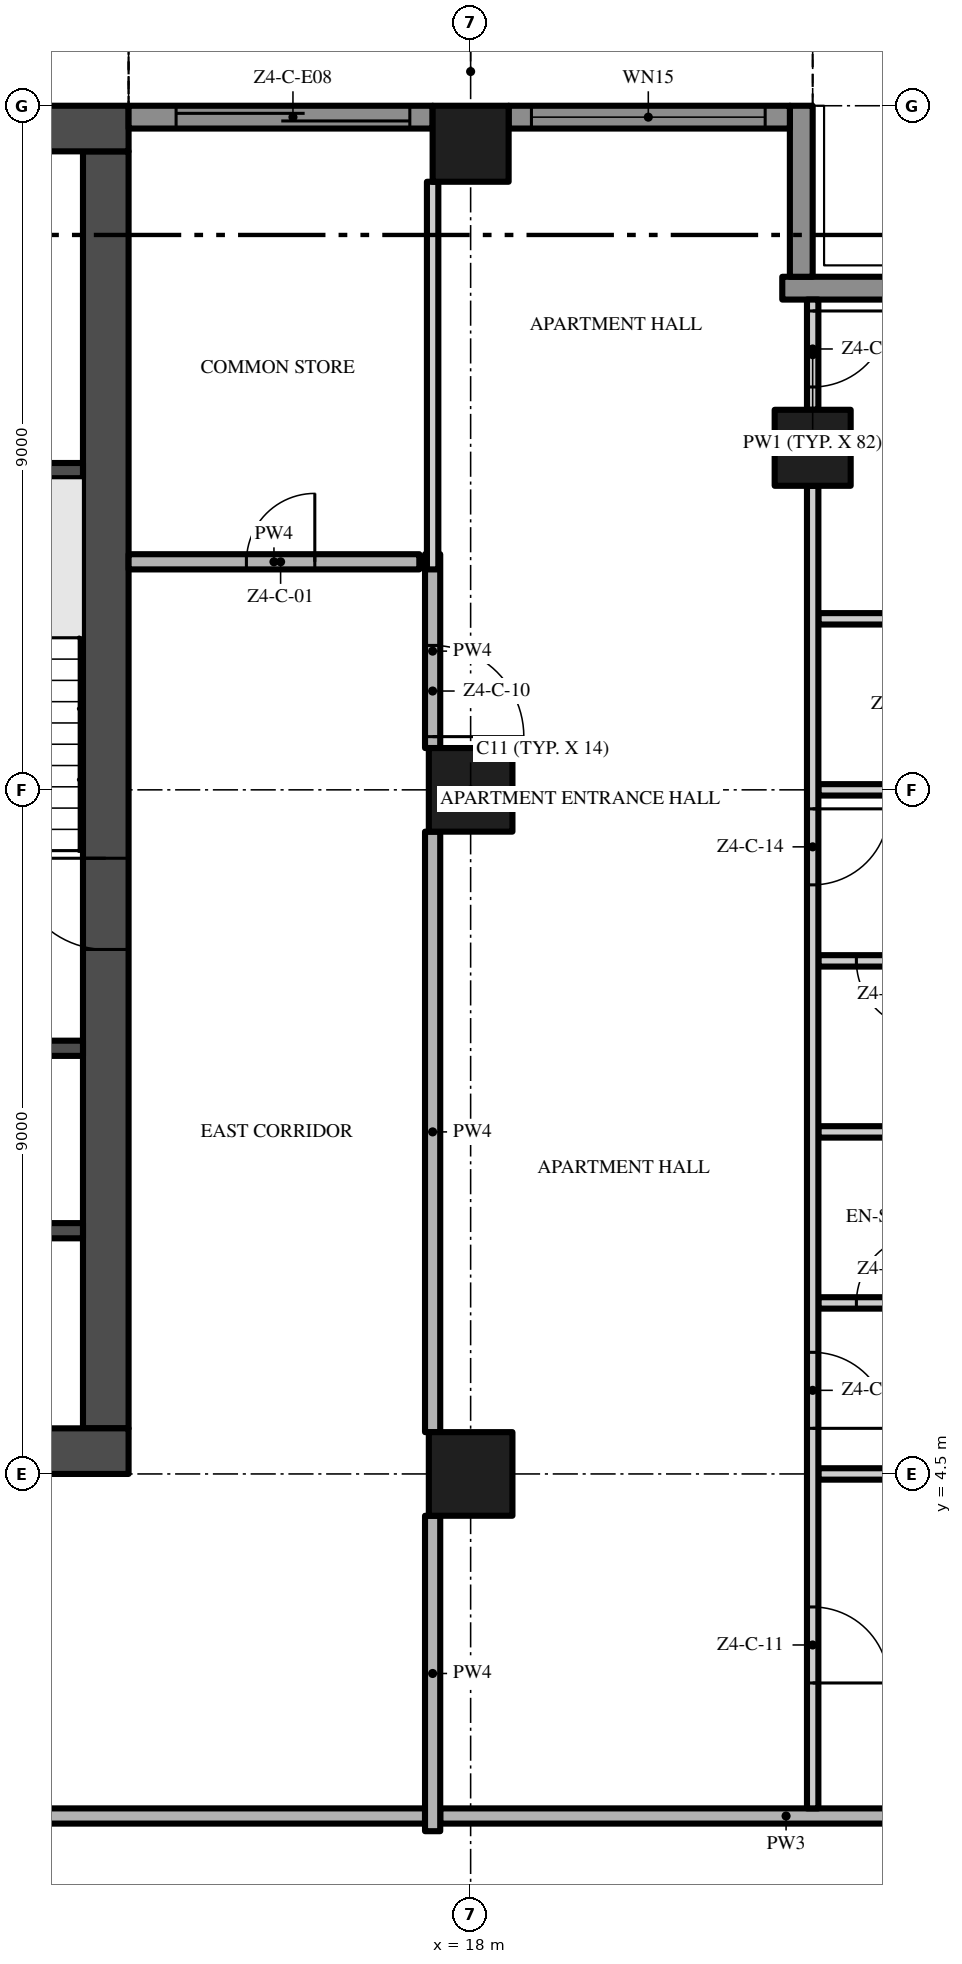
"""IFC4 building model, lengths in metres.
Left out: names, types, materials, properties, quantities, classifications, styles, units other than length and angle.
Written with IfcOpenShell. Run it as: python <this file> out.ifc"""

import sys

from ifc_helpers import new_model, si_unit, direction, frame, frame_2d, origin, origin_2d, place, context, subcontext, project, spatial, rectangle, extrude, element, fill, save


model = new_model("IFC4")
c1 = context("Model", 3, precision=1e-05, world=origin(), true_north=direction((0.0, 1.0)))
c2 = subcontext(c1, "Body", "Model", "MODEL_VIEW")
j1 = project(units=[si_unit("LENGTHUNIT", "METRE"), si_unit("PLANEANGLEUNIT", "RADIAN")], contexts=[c1])
p1 = place(None, origin())
s1 = spatial("IfcSite", under=j1, at=p1, CompositionType="ELEMENT")
p2 = place(p1, origin())
s2 = spatial("IfcBuilding", under=s1, at=p2, CompositionType="ELEMENT")
p3 = place(p2, frame((0.0, 0.0, 207.2)))
s3 = spatial("IfcBuildingStorey", under=s2, at=p3, CompositionType="ELEMENT", Elevation=207.2)
p4 = place(p3, frame((-13.5, 4.8, -0.3), z_axis=(0.0, 0.0, 1.0), x_axis=(1.0, 0.0, 0.0)))
e1 = element("IfcWall", 1, at=p4, inside=s3, PredefinedType="SHEAR", context=c2, shape_type="SweptSolid", body=[
    extrude(rectangle(XDim=27.0, YDim=0.6, at=frame_2d((13.5, 0.0))), origin(), (0.0, 0.0, 1.0), 3.8),
])
p5 = place(p4, frame((12.0, 0.0, 0.3)))
e2 = element("IfcOpeningElement", 2, at=p5, cuts=e1, PredefinedType="OPENING", context=c2, shape_type="SweptSolid", body=[
    extrude(rectangle(XDim=3.0, YDim=2.4, at=frame_2d((1.5, 1.2))), frame((0.0, 0.31, 0.0), z_axis=(0.0, -1.0, 0.0), x_axis=(1.0, 0.0, 0.0)), (0.0, 0.0, 1.0), 0.62),
])
p6 = place(p4, frame((4.9, 0.0, 0.3)))
e3 = element("IfcOpeningElement", 3, at=p6, cuts=e1, PredefinedType="OPENING", context=c2, shape_type="SweptSolid", body=[
    extrude(rectangle(XDim=1.2, YDim=2.2, at=frame_2d((0.6, 1.1))), frame((0.0, 0.31, 0.0), z_axis=(0.0, -1.0, 0.0), x_axis=(1.0, 0.0, 0.0)), (0.0, 0.0, 1.0), 0.62),
])
p7 = place(p4, frame((20.75, 0.0, 0.3)))
e4 = element("IfcOpeningElement", 4, at=p7, cuts=e1, PredefinedType="OPENING", context=c2, shape_type="SweptSolid", body=[
    extrude(rectangle(XDim=1.5, YDim=2.2, at=frame_2d((0.75, 1.1))), frame((0.0, 0.31, 0.0), z_axis=(0.0, -1.0, 0.0), x_axis=(1.0, 0.0, 0.0)), (0.0, 0.0, 1.0), 0.62),
])
p8 = place(p4, frame((17.4, 0.0, 0.3)))
e5 = element("IfcOpeningElement", 5, at=p8, cuts=e1, PredefinedType="OPENING", context=c2, shape_type="SweptSolid", body=[
    extrude(rectangle(XDim=1.2, YDim=2.2, at=frame_2d((0.6, 1.1))), frame((0.0, 0.31, 0.0), z_axis=(0.0, -1.0, 0.0), x_axis=(1.0, 0.0, 0.0)), (0.0, 0.0, 1.0), 0.62),
])
p9 = place(p3, frame((13.2, 5.1, -0.3), z_axis=(0.0, 0.0, 1.0), x_axis=(0.0, 1.0, 0.0)))
e6 = element("IfcWall", 6, at=p9, inside=s3, PredefinedType="SHEAR", context=c2, shape_type="SweptSolid", body=[
    extrude(rectangle(XDim=16.8, YDim=0.6, at=frame_2d((8.4, 0.0))), origin(), (0.0, 0.0, 1.0), 3.8),
])
p10 = place(p9, frame((6.3, 0.0, 0.3)))
e7 = element("IfcOpeningElement", 7, at=p10, cuts=e6, PredefinedType="OPENING", context=c2, shape_type="SweptSolid", body=[
    extrude(rectangle(XDim=1.2, YDim=2.2, at=frame_2d((0.6, 1.1))), frame((0.0, 0.31, 0.0), z_axis=(0.0, -1.0, 0.0), x_axis=(1.0, 0.0, 0.0)), (0.0, 0.0, 1.0), 0.62),
])
p11 = place(p3, frame((13.5, 22.2, -0.3), z_axis=(0.0, 0.0, 1.0), x_axis=(-1.0, 0.0, 0.0)))
e8 = element("IfcWall", 8, at=p11, inside=s3, PredefinedType="SHEAR", context=c2, shape_type="SweptSolid", body=[
    extrude(rectangle(XDim=27.0, YDim=0.6, at=frame_2d((13.5, 0.0))), origin(), (0.0, 0.0, 1.0), 3.8),
])
p12 = place(p3, frame((18.0, 13.5, 0.0), z_axis=(0.0, 0.0, 1.0), x_axis=(1.0, 0.0, 0.0)))
e9 = element("IfcColumn", 9, at=p12, inside=s3, PredefinedType="COLUMN", context=c2, shape_type="SweptSolid", body=[
    extrude(rectangle(XDim=1.1, YDim=1.1, at=origin_2d()), origin(), (0.0, 0.0, 1.0), 3.5),
])
p13 = place(p3, frame((18.0, 22.0, 0.0), z_axis=(0.0, 0.0, 1.0), x_axis=(1.0, 0.0, 0.0)))
e10 = element("IfcColumn", 10, at=p13, inside=s3, PredefinedType="COLUMN", context=c2, shape_type="SweptSolid", body=[
    extrude(rectangle(XDim=1.0, YDim=1.0, at=origin_2d()), origin(), (0.0, 0.0, 1.0), 3.5),
])
p14 = place(p3, frame((18.0, 4.5, 0.0), z_axis=(0.0, 0.0, 1.0), x_axis=(1.0, 0.0, 0.0)))
e11 = element("IfcColumn", 11, at=p14, inside=s3, PredefinedType="COLUMN", context=c2, shape_type="SweptSolid", body=[
    extrude(rectangle(XDim=1.1, YDim=1.1, at=origin_2d()), origin(), (0.0, 0.0, 1.0), 3.5),
])
p15 = place(p3, frame((22.5, 18.0, 0.0), z_axis=(0.0, 0.0, 1.0), x_axis=(1.0, 0.0, 0.0)))
e12 = element("IfcColumn", 12, at=p15, inside=s3, PredefinedType="COLUMN", context=c2, shape_type="SweptSolid", body=[
    extrude(rectangle(XDim=1.0, YDim=1.0, at=origin_2d()), origin(), (0.0, 0.0, 1.0), 3.5),
])
p16 = place(p3, frame((22.1, 20.1, 0.0), z_axis=(0.0, 0.0, 1.0), x_axis=(1.0, 0.0, 0.0)))
e13 = element("IfcWall", 13, at=p16, inside=s3, PredefinedType="SOLIDWALL", context=c2, shape_type="SweptSolid", body=[
    extrude(rectangle(XDim=2.35, YDim=0.3, at=frame_2d((1.175, 0.0))), origin(), (0.0, 0.0, 1.0), 3.5),
])
p17 = place(p3, frame((22.35, 22.5, 0.0), z_axis=(0.0, 0.0, 1.0), x_axis=(0.0, -1.0, 0.0)))
e14 = element("IfcWall", 14, at=p17, inside=s3, PredefinedType="SOLIDWALL", context=c2, shape_type="SweptSolid", body=[
    extrude(rectangle(XDim=2.25, YDim=0.3, at=frame_2d((1.125, 0.0))), origin(), (0.0, 0.0, 1.0), 3.5),
])
p18 = place(p3, frame((18.5, 22.35, 0.0), z_axis=(0.0, 0.0, 1.0), x_axis=(1.0, 0.0, 0.0)))
e15 = element("IfcWall", 15, at=p18, inside=s3, PredefinedType="SOLIDWALL", context=c2, shape_type="SweptSolid", body=[
    extrude(rectangle(XDim=3.7, YDim=0.3, at=frame_2d((1.85, 0.0))), origin(), (0.0, 0.0, 1.0), 3.5),
])
p19 = place(p18, frame((0.3, 0.0, 0.45)))
e16 = element("IfcOpeningElement", 16, at=p19, cuts=e15, PredefinedType="OPENING", context=c2, shape_type="SweptSolid", body=[
    extrude(rectangle(XDim=3.075, YDim=2.65, at=frame_2d((1.538, 1.325))), frame((0.0, 0.16, 0.0), z_axis=(0.0, -1.0, 0.0), x_axis=(1.0, 0.0, 0.0)), (0.0, 0.0, 1.0), 0.32),
])
p20 = place(p3, frame((13.5, 22.35, 0.0), z_axis=(0.0, 0.0, 1.0), x_axis=(1.0, 0.0, 0.0)))
e17 = element("IfcWall", 17, at=p20, inside=s3, PredefinedType="SOLIDWALL", context=c2, shape_type="SweptSolid", body=[
    extrude(rectangle(XDim=4.0, YDim=0.3, at=frame_2d((2.0, 0.0))), origin(), (0.0, 0.0, 1.0), 3.5),
])
p21 = place(p20, frame((0.625, 0.0, 0.0)))
e18 = element("IfcOpeningElement", 18, at=p21, cuts=e17, PredefinedType="OPENING", context=c2, shape_type="SweptSolid", body=[
    extrude(rectangle(XDim=3.075, YDim=2.4, at=frame_2d((1.538, 1.2))), frame((0.0, 0.16, 0.0), z_axis=(0.0, -1.0, 0.0), x_axis=(1.0, 0.0, 0.0)), (0.0, 0.0, 1.0), 0.32),
])
for number, where, z_axis, x_axis in (
    (19, (9.65, 7.7, 0.0), (0.0, 0.0, 1.0), (1.0, 0.0, 0.0)),
    (20, (9.65, 10.1, 0.0), (0.0, 0.0, 1.0), (1.0, 0.0, 0.0)),
    (21, (9.65, 17.7, 0.0), (0.0, 0.0, 1.0), (1.0, 0.0, 0.0)),
):
    element("IfcWall", number, at=place(p3, frame(where, z_axis=z_axis, x_axis=x_axis)), inside=s3, PredefinedType="SHEAR", context=c2, shape_type="SweptSolid", body=[
        extrude(rectangle(XDim=3.25, YDim=0.2, at=frame_2d((1.625, 0.0))), origin(), (0.0, 0.0, 1.0), 3.5),
    ])
p22 = place(p3, frame((17.4, 0.0, 0.0), z_axis=(0.0, 0.0, 1.0), x_axis=(-1.0, 0.0, 0.0)))
e22 = element("IfcWall", 22, at=p22, inside=s3, PredefinedType="PARTITIONING", context=c2, shape_type="SweptSolid", body=[
    extrude(rectangle(XDim=17.3, YDim=0.2, at=frame_2d((8.65, 0.0))), origin(), (0.0, 0.0, 1.0), 3.5),
])
p23 = place(p22, frame((7.65, 0.0, 0.0)))
e23 = element("IfcOpeningElement", 23, at=p23, cuts=e22, PredefinedType="OPENING", context=c2, shape_type="SweptSolid", body=[
    extrude(rectangle(XDim=1.5, YDim=2.4, at=frame_2d((0.75, 1.2))), frame((0.0, 0.11, 0.0), z_axis=(0.0, -1.0, 0.0), x_axis=(1.0, 0.0, 0.0)), (0.0, 0.0, 1.0), 0.22),
])
p24 = place(p3, frame((17.6, 0.0, 0.0), z_axis=(0.0, 0.0, 1.0), x_axis=(1.0, 0.0, 0.0)))
e24 = element("IfcWall", 24, at=p24, inside=s3, PredefinedType="PARTITIONING", context=c2, shape_type="SweptSolid", body=[
    extrude(rectangle(XDim=9.1, YDim=0.2, at=frame_2d((4.55, 0.0))), origin(), (0.0, 0.0, 1.0), 3.5),
])
p25 = place(p3, frame((22.575, 4.5, 0.0), z_axis=(0.0, 0.0, 1.0), x_axis=(1.0, 0.0, 0.0)))
e25 = element("IfcWall", 25, at=p25, inside=s3, PredefinedType="PARTITIONING", context=c2, shape_type="SweptSolid", body=[
    extrude(rectangle(XDim=3.425, YDim=0.15, at=frame_2d((1.712, 0.0))), origin(), (0.0, 0.0, 1.0), 3.5),
])
p26 = place(p3, frame((22.575, 6.75, 0.0), z_axis=(0.0, 0.0, 1.0), x_axis=(1.0, 0.0, 0.0)))
e26 = element("IfcWall", 26, at=p26, inside=s3, PredefinedType="PARTITIONING", context=c2, shape_type="SweptSolid", body=[
    extrude(rectangle(XDim=1.875, YDim=0.15, at=frame_2d((0.938, 0.0))), origin(), (0.0, 0.0, 1.0), 3.5),
])
p27 = place(p26, frame((0.5, 0.0, 0.0)))
e27 = element("IfcOpeningElement", 27, at=p27, cuts=e26, PredefinedType="OPENING", context=c2, shape_type="SweptSolid", body=[
    extrude(rectangle(XDim=0.9, YDim=2.1, at=frame_2d((0.45, 1.05))), frame((0.0, 0.085, 0.0), z_axis=(0.0, -1.0, 0.0), x_axis=(1.0, 0.0, 0.0)), (0.0, 0.0, 1.0), 0.17),
])
p28 = place(p3, frame((22.575, 9.0, 0.0), z_axis=(0.0, 0.0, 1.0), x_axis=(1.0, 0.0, 0.0)))
e28 = element("IfcWall", 28, at=p28, inside=s3, PredefinedType="PARTITIONING", context=c2, shape_type="SweptSolid", body=[
    extrude(rectangle(XDim=1.875, YDim=0.15, at=frame_2d((0.938, 0.0))), origin(), (0.0, 0.0, 1.0), 3.5),
])
p29 = place(p3, frame((24.45, 11.25, 0.0), z_axis=(0.0, 0.0, 1.0), x_axis=(-1.0, 0.0, 0.0)))
e29 = element("IfcWall", 29, at=p29, inside=s3, PredefinedType="PARTITIONING", context=c2, shape_type="SweptSolid", body=[
    extrude(rectangle(XDim=1.875, YDim=0.15, at=frame_2d((0.938, 0.0))), origin(), (0.0, 0.0, 1.0), 3.5),
])
p30 = place(p29, frame((0.475, 0.0, 0.0)))
e30 = element("IfcOpeningElement", 30, at=p30, cuts=e29, PredefinedType="OPENING", context=c2, shape_type="SweptSolid", body=[
    extrude(rectangle(XDim=0.9, YDim=2.1, at=frame_2d((0.45, 1.05))), frame((0.0, 0.085, 0.0), z_axis=(0.0, -1.0, 0.0), x_axis=(1.0, 0.0, 0.0)), (0.0, 0.0, 1.0), 0.17),
])
p31 = place(p3, frame((22.575, 13.5, 0.0), z_axis=(0.0, 0.0, 1.0), x_axis=(1.0, 0.0, 0.0)))
e31 = element("IfcWall", 31, at=p31, inside=s3, PredefinedType="PARTITIONING", context=c2, shape_type="SweptSolid", body=[
    extrude(rectangle(XDim=3.425, YDim=0.15, at=frame_2d((1.712, 0.0))), origin(), (0.0, 0.0, 1.0), 3.5),
])
p32 = place(p3, frame((22.575, 15.75, 0.0), z_axis=(0.0, 0.0, 1.0), x_axis=(1.0, 0.0, 0.0)))
e32 = element("IfcWall", 32, at=p32, inside=s3, PredefinedType="PARTITIONING", context=c2, shape_type="SweptSolid", body=[
    extrude(rectangle(XDim=1.875, YDim=0.15, at=frame_2d((0.938, 0.0))), origin(), (0.0, 0.0, 1.0), 3.5),
])
p33 = place(p3, frame((13.5, 16.5, 0.0), z_axis=(0.0, 0.0, 1.0), x_axis=(1.0, 0.0, 0.0)))
e33 = element("IfcWall", 33, at=p33, inside=s3, PredefinedType="PARTITIONING", context=c2, shape_type="SweptSolid", body=[
    extrude(rectangle(XDim=3.825, YDim=0.2, at=frame_2d((1.913, 0.0))), origin(), (0.0, 0.0, 1.0), 3.5),
])
p34 = place(p33, frame((1.55, 0.0, 0.0)))
e34 = element("IfcOpeningElement", 34, at=p34, cuts=e33, PredefinedType="OPENING", context=c2, shape_type="SweptSolid", body=[
    extrude(rectangle(XDim=0.9, YDim=2.1, at=frame_2d((0.45, 1.05))), frame((0.0, 0.11, 0.0), z_axis=(0.0, -1.0, 0.0), x_axis=(1.0, 0.0, 0.0)), (0.0, 0.0, 1.0), 0.22),
])
p35 = place(p3, frame((17.5, -0.2, 0.0), z_axis=(0.0, 0.0, 1.0), x_axis=(0.0, 1.0, 0.0)))
e35 = element("IfcWall", 35, at=p35, inside=s3, PredefinedType="PARTITIONING", context=c2, shape_type="SweptSolid", body=[
    extrude(rectangle(XDim=4.15, YDim=0.2, at=frame_2d((2.075, 0.0))), origin(), (0.0, 0.0, 1.0), 3.5),
])
p36 = place(p3, frame((17.5, 5.05, 0.0), z_axis=(0.0, 0.0, 1.0), x_axis=(0.0, 1.0, 0.0)))
e36 = element("IfcWall", 36, at=p36, inside=s3, PredefinedType="PARTITIONING", context=c2, shape_type="SweptSolid", body=[
    extrude(rectangle(XDim=7.9, YDim=0.2, at=frame_2d((3.95, 0.0))), origin(), (0.0, 0.0, 1.0), 3.5),
])
p37 = place(p3, frame((17.5, 16.6, 0.0), z_axis=(0.0, 0.0, 1.0), x_axis=(0.0, -1.0, 0.0)))
e37 = element("IfcWall", 37, at=p37, inside=s3, PredefinedType="PARTITIONING", context=c2, shape_type="SweptSolid", body=[
    extrude(rectangle(XDim=2.55, YDim=0.2, at=frame_2d((1.275, 0.0))), origin(), (0.0, 0.0, 1.0), 3.5),
])
p38 = place(p37, frame((1.2, 0.0, 0.0)))
e38 = element("IfcOpeningElement", 38, at=p38, cuts=e37, PredefinedType="OPENING", context=c2, shape_type="SweptSolid", body=[
    extrude(rectangle(XDim=1.2, YDim=2.4, at=frame_2d((0.6, 1.2))), frame((0.0, 0.11, 0.0), z_axis=(0.0, -1.0, 0.0), x_axis=(1.0, 0.0, 0.0)), (0.0, 0.0, 1.0), 0.22),
])
p39 = place(p3, frame((17.5, 16.4, 0.0), z_axis=(0.0, 0.0, 1.0), x_axis=(0.0, 1.0, 0.0)))
e39 = element("IfcWall", 39, at=p39, inside=s3, PredefinedType="PARTITIONING", context=c2, shape_type="SweptSolid", body=[
    extrude(rectangle(XDim=5.1, YDim=0.15, at=frame_2d((2.55, 0.0))), origin(), (0.0, 0.0, 1.0), 3.5),
])
p40 = place(p3, frame((22.5, 17.5, 0.0), z_axis=(0.0, 0.0, 1.0), x_axis=(0.0, -1.0, 0.0)))
e40 = element("IfcWall", 40, at=p40, inside=s3, PredefinedType="PARTITIONING", context=c2, shape_type="SweptSolid", body=[
    extrude(rectangle(XDim=17.4, YDim=0.15, at=frame_2d((8.7, 0.0))), origin(), (0.0, 0.0, 1.0), 3.5),
])
p41 = place(p40, frame((14.75, 0.0, 0.0)))
e41 = element("IfcOpeningElement", 41, at=p41, cuts=e40, PredefinedType="OPENING", context=c2, shape_type="SweptSolid", body=[
    extrude(rectangle(XDim=1.0, YDim=2.4, at=frame_2d((0.5, 1.2))), frame((0.0, 0.085, 0.0), z_axis=(0.0, -1.0, 0.0), x_axis=(1.0, 0.0, 0.0)), (0.0, 0.0, 1.0), 0.17),
])
p42 = place(p40, frame((11.4, 0.0, 0.0)))
e42 = element("IfcOpeningElement", 42, at=p42, cuts=e40, PredefinedType="OPENING", context=c2, shape_type="SweptSolid", body=[
    extrude(rectangle(XDim=1.0, YDim=2.4, at=frame_2d((0.5, 1.2))), frame((0.0, 0.085, 0.0), z_axis=(0.0, -1.0, 0.0), x_axis=(1.0, 0.0, 0.0)), (0.0, 0.0, 1.0), 0.17),
])
p43 = place(p40, frame((4.25, 0.0, 0.0)))
e43 = element("IfcOpeningElement", 43, at=p43, cuts=e40, PredefinedType="OPENING", context=c2, shape_type="SweptSolid", body=[
    extrude(rectangle(XDim=1.0, YDim=2.4, at=frame_2d((0.5, 1.2))), frame((0.0, 0.085, 0.0), z_axis=(0.0, -1.0, 0.0), x_axis=(1.0, 0.0, 0.0)), (0.0, 0.0, 1.0), 0.17),
])
p44 = place(p3, frame((22.5, 19.95, 0.0), z_axis=(0.0, 0.0, 1.0), x_axis=(0.0, -1.0, 0.0)))
e44 = element("IfcWall", 44, at=p44, inside=s3, PredefinedType="PARTITIONING", context=c2, shape_type="SweptSolid", body=[
    extrude(rectangle(XDim=1.45, YDim=0.15, at=frame_2d((0.725, 0.0))), origin(), (0.0, 0.0, 1.0), 3.5),
])
p45 = place(p44, frame((0.15, 0.0, 0.0)))
e45 = element("IfcOpeningElement", 45, at=p45, cuts=e44, PredefinedType="OPENING", context=c2, shape_type="SweptSolid", body=[
    extrude(rectangle(XDim=1.0, YDim=2.4, at=frame_2d((0.5, 1.2))), frame((0.0, 0.085, 0.0), z_axis=(0.0, -1.0, 0.0), x_axis=(1.0, 0.0, 0.0)), (0.0, 0.0, 1.0), 0.17),
])
p46 = place(p19, origin())
e46 = element("IfcWindow", 46, at=p46, inside=s3, PartitioningType="SINGLE_PANEL", PredefinedType="WINDOW", context=c2, shape_type="SweptSolid", body=[
    extrude(rectangle(XDim=3.075, YDim=2.65, at=frame_2d((1.538, 1.325))), frame((0.0, 0.03, 0.0), z_axis=(0.0, -1.0, 0.0), x_axis=(1.0, 0.0, 0.0)), (0.0, 0.0, 1.0), 0.06),
])
fill(e16, e46)
p47 = place(p21, origin())
e47 = element("IfcDoor", 47, at=p47, inside=s3, OperationType="SINGLE_SWING_LEFT", PredefinedType="DOOR", context=c2, shape_type="SweptSolid", body=[
    extrude(rectangle(XDim=3.075, YDim=2.4, at=frame_2d((1.538, 1.2))), frame((0.0, 0.025, 0.0), z_axis=(0.0, -1.0, 0.0), x_axis=(1.0, 0.0, 0.0)), (0.0, 0.0, 1.0), 0.05),
])
fill(e18, e47)
p48 = place(p10, frame((1.2, 0.0, 0.0), z_axis=(0.0, 0.0, 1.0), x_axis=(-1.0, 0.0, 0.0)))
e48 = element("IfcDoor", 48, at=p48, inside=s3, OperationType="SINGLE_SWING_LEFT", PredefinedType="DOOR", context=c2, shape_type="SweptSolid", body=[
    extrude(rectangle(XDim=1.2, YDim=2.2, at=frame_2d((0.6, 1.1))), frame((0.0, 0.025, 0.0), z_axis=(0.0, -1.0, 0.0), x_axis=(1.0, 0.0, 0.0)), (0.0, 0.0, 1.0), 0.05),
])
fill(e7, e48)
p49 = place(p34, origin())
e49 = element("IfcDoor", 49, at=p49, inside=s3, OperationType="SINGLE_SWING_RIGHT", PredefinedType="DOOR", context=c2, shape_type="SweptSolid", body=[
    extrude(rectangle(XDim=0.9, YDim=2.1, at=frame_2d((0.45, 1.05))), frame((0.0, 0.025, 0.0), z_axis=(0.0, -1.0, 0.0), x_axis=(1.0, 0.0, 0.0)), (0.0, 0.0, 1.0), 0.05),
])
fill(e34, e49)
p50 = place(p38, origin())
e50 = element("IfcDoor", 50, at=p50, inside=s3, OperationType="SINGLE_SWING_RIGHT", PredefinedType="DOOR", context=c2, shape_type="SweptSolid", body=[
    extrude(rectangle(XDim=1.2, YDim=2.4, at=frame_2d((0.6, 1.2))), frame((0.0, 0.025, 0.0), z_axis=(0.0, -1.0, 0.0), x_axis=(1.0, 0.0, 0.0)), (0.0, 0.0, 1.0), 0.05),
])
fill(e38, e50)
p51 = place(p41, origin())
e51 = element("IfcDoor", 51, at=p51, inside=s3, OperationType="SINGLE_SWING_RIGHT", PredefinedType="DOOR", context=c2, shape_type="SweptSolid", body=[
    extrude(rectangle(XDim=1.0, YDim=2.4, at=frame_2d((0.5, 1.2))), frame((0.0, 0.025, 0.0), z_axis=(0.0, -1.0, 0.0), x_axis=(1.0, 0.0, 0.0)), (0.0, 0.0, 1.0), 0.05),
])
fill(e41, e51)
p52 = place(p42, origin())
e52 = element("IfcDoor", 52, at=p52, inside=s3, OperationType="SINGLE_SWING_RIGHT", PredefinedType="DOOR", context=c2, shape_type="SweptSolid", body=[
    extrude(rectangle(XDim=1.0, YDim=2.4, at=frame_2d((0.5, 1.2))), frame((0.0, 0.025, 0.0), z_axis=(0.0, -1.0, 0.0), x_axis=(1.0, 0.0, 0.0)), (0.0, 0.0, 1.0), 0.05),
])
fill(e42, e52)
p53 = place(p27, origin())
e53 = element("IfcDoor", 53, at=p53, inside=s3, OperationType="SINGLE_SWING_RIGHT", PredefinedType="DOOR", context=c2, shape_type="SweptSolid", body=[
    extrude(rectangle(XDim=0.9, YDim=2.1, at=frame_2d((0.45, 1.05))), frame((0.0, 0.025, 0.0), z_axis=(0.0, -1.0, 0.0), x_axis=(1.0, 0.0, 0.0)), (0.0, 0.0, 1.0), 0.05),
])
fill(e27, e53)
p54 = place(p43, origin())
e54 = element("IfcDoor", 54, at=p54, inside=s3, OperationType="SINGLE_SWING_LEFT", PredefinedType="DOOR", context=c2, shape_type="SweptSolid", body=[
    extrude(rectangle(XDim=1.0, YDim=2.4, at=frame_2d((0.5, 1.2))), frame((0.0, 0.025, 0.0), z_axis=(0.0, -1.0, 0.0), x_axis=(1.0, 0.0, 0.0)), (0.0, 0.0, 1.0), 0.05),
])
fill(e43, e54)
p55 = place(p30, origin())
e55 = element("IfcDoor", 55, at=p55, inside=s3, OperationType="SINGLE_SWING_LEFT", PredefinedType="DOOR", context=c2, shape_type="SweptSolid", body=[
    extrude(rectangle(XDim=0.9, YDim=2.1, at=frame_2d((0.45, 1.05))), frame((0.0, 0.025, 0.0), z_axis=(0.0, -1.0, 0.0), x_axis=(1.0, 0.0, 0.0)), (0.0, 0.0, 1.0), 0.05),
])
fill(e30, e55)
p56 = place(p45, origin())
e56 = element("IfcDoor", 56, at=p56, inside=s3, OperationType="SINGLE_SWING_LEFT", PredefinedType="DOOR", context=c2, shape_type="SweptSolid", body=[
    extrude(rectangle(XDim=1.0, YDim=2.4, at=frame_2d((0.5, 1.2))), frame((0.0, 0.025, 0.0), z_axis=(0.0, -1.0, 0.0), x_axis=(1.0, 0.0, 0.0)), (0.0, 0.0, 1.0), 0.05),
])
fill(e45, e56)
save(model, sys.argv[1])
